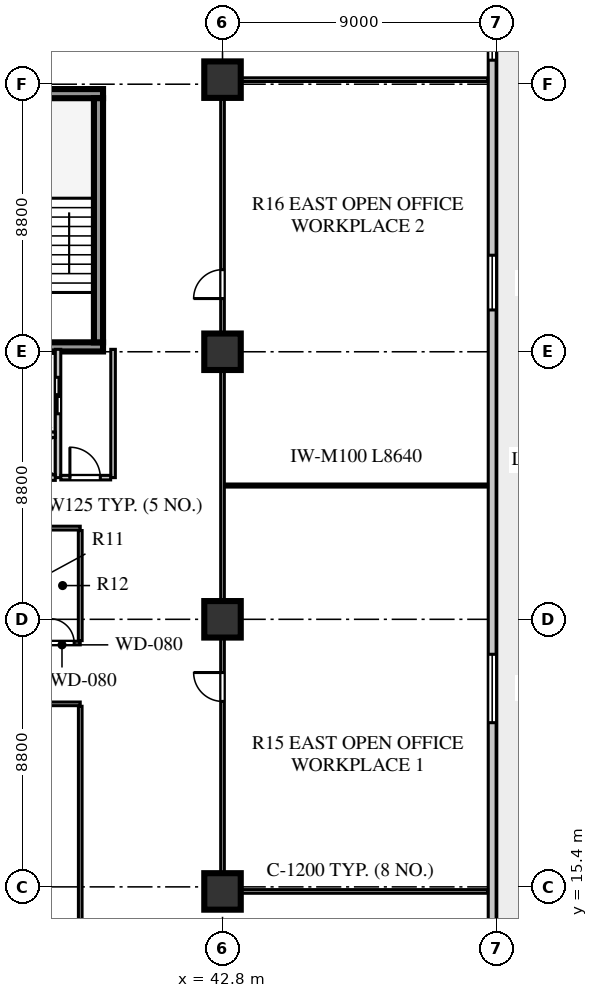
"""IFC4 building model, lengths in metres.
Left out: names, types, materials, properties, quantities, classifications, styles, units other than length and angle.
Written with IfcOpenShell. Run it as: python <this file> out.ifc"""

import sys

from ifc_helpers import new_model, si_unit, direction, frame, frame_2d, origin, origin_2d, place, context, subcontext, project, spatial, rectangle, extrude, element, fill, save


model = new_model("IFC4")
c1 = context("Model", 3, precision=1e-05, world=origin(), true_north=direction((0.0, 1.0)))
c2 = subcontext(c1, "Body", "Model", "MODEL_VIEW")
j1 = project(units=[si_unit("LENGTHUNIT", "METRE"), si_unit("PLANEANGLEUNIT", "RADIAN")], contexts=[c1])
p1 = place(None, origin())
s1 = spatial("IfcSite", under=j1, at=p1, CompositionType="ELEMENT")
p2 = place(p1, origin())
s2 = spatial("IfcBuilding", under=s1, at=p2, CompositionType="ELEMENT")
p3 = place(p2, frame((0.0, 0.0, 26.0)))
s3 = spatial("IfcBuildingStorey", under=s2, at=p3, CompositionType="ELEMENT", Elevation=26.0)
for number, where, z_axis, x_axis in (
    (1, (34.4, 33.16, 0.0), (0.0, 0.0, 1.0), (1.0, 0.0, 0.0)),
    (2, (34.4, 41.49, 0.0), (0.0, 0.0, 1.0), (1.0, 0.0, 0.0)),
):
    element("IfcWall", number, at=place(p3, frame(where, z_axis=z_axis, x_axis=x_axis)), inside=s3, PredefinedType="SHEAR", context=c2, shape_type="SweptSolid", body=[
        extrude(rectangle(XDim=4.47, YDim=0.3, at=frame_2d((2.235, 0.0))), origin(), (0.0, 0.0, 1.0), 3.72),
    ])
p4 = place(p3, frame((38.72, 33.31, 0.0), z_axis=(0.0, 0.0, 1.0), x_axis=(0.0, 1.0, 0.0)))
e3 = element("IfcWall", 3, at=p4, inside=s3, PredefinedType="SHEAR", context=c2, shape_type="SweptSolid", body=[
    extrude(rectangle(XDim=8.03, YDim=0.3, at=frame_2d((4.015, 0.0))), origin(), (0.0, 0.0, 1.0), 3.72),
])
for number, where, z_axis, x_axis in (
    (4, (42.8, 15.25, 0.0), (0.0, 0.0, 1.0), (1.0, 0.0, 0.0)),
    (5, (42.8, 24.2, 0.0), (0.0, 0.0, 1.0), (1.0, 0.0, 0.0)),
    (6, (42.8, 33.0, 0.0), (0.0, 0.0, 1.0), (1.0, 0.0, 0.0)),
    (7, (42.8, 41.95, 0.0), (0.0, 0.0, 1.0), (1.0, 0.0, 0.0)),
):
    element("IfcColumn", number, at=place(p3, frame(where, z_axis=z_axis, x_axis=x_axis)), inside=s3, PredefinedType="COLUMN", context=c2, shape_type="SweptSolid", body=[
        extrude(rectangle(XDim=1.2, YDim=1.2, at=origin_2d()), origin(), (0.0, 0.0, 1.0), 3.72),
    ])
p5 = place(p3, frame((51.67, 12.36, 0.0), z_axis=(0.0, 0.0, 1.0), x_axis=(0.0, 1.0, 0.0)))
e8 = element("IfcWall", 8, at=p5, inside=s3, PredefinedType="SOLIDWALL", context=c2, shape_type="SweptSolid", body=[
    extrude(rectangle(XDim=32.48, YDim=0.26, at=frame_2d((16.24, 0.0))), origin(), (0.0, 0.0, 1.0), 3.72),
])
p6 = place(p5, frame((0.69, 0.0, 0.0)))
e9 = element("IfcOpeningElement", 9, at=p6, cuts=e8, PredefinedType="OPENING", context=c2, shape_type="SweptSolid", body=[
    extrude(rectangle(XDim=1.0, YDim=2.05, at=frame_2d((0.5, 1.025))), frame((0.0, 0.14, 0.0), z_axis=(0.0, -1.0, 0.0), x_axis=(1.0, 0.0, 0.0)), (0.0, 0.0, 1.0), 0.28),
])
p7 = place(p5, frame((8.44, 0.0, 0.8)))
e10 = element("IfcOpeningElement", 10, at=p7, cuts=e8, PredefinedType="OPENING", context=c2, shape_type="SweptSolid", body=[
    extrude(rectangle(XDim=2.25, YDim=2.0, at=frame_2d((1.125, 1.0))), frame((0.0, 0.14, 0.0), z_axis=(0.0, -1.0, 0.0), x_axis=(1.0, 0.0, 0.0)), (0.0, 0.0, 1.0), 0.28),
])
p8 = place(p5, frame((22.015, 0.0, 0.8)))
e11 = element("IfcOpeningElement", 11, at=p8, cuts=e8, PredefinedType="OPENING", context=c2, shape_type="SweptSolid", body=[
    extrude(rectangle(XDim=1.8, YDim=2.0, at=frame_2d((0.9, 1.0))), frame((0.0, 0.14, 0.0), z_axis=(0.0, -1.0, 0.0), x_axis=(1.0, 0.0, 0.0)), (0.0, 0.0, 1.0), 0.28),
])
p9 = place(p5, frame((30.23, 0.0, 0.8)))
e12 = element("IfcOpeningElement", 12, at=p9, cuts=e8, PredefinedType="OPENING", context=c2, shape_type="SweptSolid", body=[
    extrude(rectangle(XDim=1.5, YDim=2.0, at=frame_2d((0.75, 1.0))), frame((0.0, 0.14, 0.0), z_axis=(0.0, -1.0, 0.0), x_axis=(1.0, 0.0, 0.0)), (0.0, 0.0, 1.0), 0.28),
])
p10 = place(p3, frame((37.39, 28.86, 0.0), z_axis=(0.0, 0.0, 1.0), x_axis=(0.0, 1.0, 0.0)))
e13 = element("IfcWall", 13, at=p10, inside=s3, PredefinedType="SOLIDWALL", context=c2, shape_type="SweptSolid", body=[
    extrude(rectangle(XDim=4.22, YDim=0.18, at=frame_2d((2.11, 0.0))), origin(), (0.0, 0.0, 1.0), 3.72),
])
p11 = place(p10, frame((2.1, 0.0, 0.0)))
e14 = element("IfcOpeningElement", 14, at=p11, cuts=e13, PredefinedType="OPENING", context=c2, shape_type="SweptSolid", body=[
    extrude(rectangle(XDim=1.2, YDim=2.12, at=frame_2d((0.6, 1.06))), frame((0.0, 0.1, 0.0), z_axis=(0.0, -1.0, 0.0), x_axis=(1.0, 0.0, 0.0)), (0.0, 0.0, 1.0), 0.2),
])
for number, where, z_axis, x_axis in (
    (15, (35.05, 28.86, 0.0), (0.0, 0.0, 1.0), (1.0, 0.0, 0.0)),
    (16, (35.05, 30.27, 0.0), (0.0, 0.0, 1.0), (1.0, 0.0, 0.0)),
):
    element("IfcWall", number, at=place(p3, frame(where, z_axis=z_axis, x_axis=x_axis)), inside=s3, PredefinedType="SOLIDWALL", context=c2, shape_type="SweptSolid", body=[
        extrude(rectangle(XDim=2.25, YDim=0.18, at=frame_2d((1.125, 0.0))), origin(), (0.0, 0.0, 1.0), 3.72),
    ])
p12 = place(p3, frame((39.2, 28.86, 0.0), z_axis=(0.0, 0.0, 1.0), x_axis=(0.0, 1.0, 0.0)))
e17 = element("IfcWall", 17, at=p12, inside=s3, PredefinedType="PARTITIONING", context=c2, shape_type="SweptSolid", body=[
    extrude(rectangle(XDim=4.22, YDim=0.15, at=frame_2d((2.11, 0.0))), origin(), (0.0, 0.0, 1.0), 3.72),
])
p13 = place(p3, frame((37.48, 28.86, 0.0), z_axis=(0.0, 0.0, 1.0), x_axis=(1.0, 0.0, 0.0)))
e18 = element("IfcWall", 18, at=p13, inside=s3, PredefinedType="PARTITIONING", context=c2, shape_type="SweptSolid", body=[
    extrude(rectangle(XDim=1.64, YDim=0.15, at=frame_2d((0.82, 0.0))), origin(), (0.0, 0.0, 1.0), 3.72),
])
p14 = place(p13, frame((0.3, 0.0, 0.0)))
e19 = element("IfcOpeningElement", 19, at=p14, cuts=e18, PredefinedType="OPENING", context=c2, shape_type="SweptSolid", body=[
    extrude(rectangle(XDim=1.0, YDim=2.1, at=frame_2d((0.5, 1.05))), frame((0.0, 0.085, 0.0), z_axis=(0.0, -1.0, 0.0), x_axis=(1.0, 0.0, 0.0)), (0.0, 0.0, 1.0), 0.17),
])
p15 = place(p3, frame((25.25, 21.42, 0.0), z_axis=(0.0, 0.0, 1.0), x_axis=(1.0, 0.0, 0.0)))
e20 = element("IfcWall", 20, at=p15, inside=s3, PredefinedType="PARTITIONING", context=c2, shape_type="SweptSolid", body=[
    extrude(rectangle(XDim=12.87, YDim=0.12, at=frame_2d((6.435, 0.0))), origin(), (0.0, 0.0, 1.0), 3.32),
])
p16 = place(p15, frame((5.945, 0.0, 0.0)))
e21 = element("IfcOpeningElement", 21, at=p16, cuts=e20, PredefinedType="OPENING", context=c2, shape_type="SweptSolid", body=[
    extrude(rectangle(XDim=0.95, YDim=2.08, at=frame_2d((0.475, 1.04))), frame((0.0, 0.07, 0.0), z_axis=(0.0, -1.0, 0.0), x_axis=(1.0, 0.0, 0.0)), (0.0, 0.0, 1.0), 0.14),
])
p17 = place(p3, frame((38.12, 6.88, 0.0), z_axis=(0.0, 0.0, 1.0), x_axis=(0.0, 1.0, 0.0)))
e22 = element("IfcWall", 22, at=p17, inside=s3, PredefinedType="PARTITIONING", context=c2, shape_type="SweptSolid", body=[
    extrude(rectangle(XDim=14.46, YDim=0.12, at=frame_2d((7.23, 0.0))), origin(), (0.0, 0.0, 1.0), 3.72),
])
p18 = place(p3, frame((34.6, 23.42, 0.0), z_axis=(0.0, 0.0, 1.0), x_axis=(1.0, 0.0, 0.0)))
e23 = element("IfcWall", 23, at=p18, inside=s3, PredefinedType="PARTITIONING", context=c2, shape_type="SweptSolid", body=[
    extrude(rectangle(XDim=3.52, YDim=0.12, at=frame_2d((1.76, 0.0))), origin(), (0.0, 0.0, 1.0), 3.72),
])
p19 = place(p18, frame((0.22, 0.0, 0.0)))
e24 = element("IfcOpeningElement", 24, at=p19, cuts=e23, PredefinedType="OPENING", context=c2, shape_type="SweptSolid", body=[
    extrude(rectangle(XDim=0.8, YDim=2.05, at=frame_2d((0.4, 1.025))), frame((0.0, 0.07, 0.0), z_axis=(0.0, -1.0, 0.0), x_axis=(1.0, 0.0, 0.0)), (0.0, 0.0, 1.0), 0.14),
])
p20 = place(p18, frame((1.38, 0.0, 0.0)))
e25 = element("IfcOpeningElement", 25, at=p20, cuts=e23, PredefinedType="OPENING", context=c2, shape_type="SweptSolid", body=[
    extrude(rectangle(XDim=0.8, YDim=2.05, at=frame_2d((0.4, 1.025))), frame((0.0, 0.07, 0.0), z_axis=(0.0, -1.0, 0.0), x_axis=(1.0, 0.0, 0.0)), (0.0, 0.0, 1.0), 0.14),
])
p21 = place(p18, frame((2.52, 0.0, 0.0)))
e26 = element("IfcOpeningElement", 26, at=p21, cuts=e23, PredefinedType="OPENING", context=c2, shape_type="SweptSolid", body=[
    extrude(rectangle(XDim=0.8, YDim=2.05, at=frame_2d((0.4, 1.025))), frame((0.0, 0.07, 0.0), z_axis=(0.0, -1.0, 0.0), x_axis=(1.0, 0.0, 0.0)), (0.0, 0.0, 1.0), 0.14),
])
p22 = place(p3, frame((42.8, 15.25, 0.0), z_axis=(0.0, 0.0, 1.0), x_axis=(0.0, 1.0, 0.0)))
e27 = element("IfcWall", 27, at=p22, inside=s3, PredefinedType="PARTITIONING", context=c2, shape_type="SweptSolid", body=[
    extrude(rectangle(XDim=26.7, YDim=0.12, at=frame_2d((13.35, 0.0))), origin(), (0.0, 0.0, 1.0), 3.02),
])
p23 = place(p22, frame((6.25, 0.0, 0.0)))
e28 = element("IfcOpeningElement", 28, at=p23, cuts=e27, PredefinedType="OPENING", context=c2, shape_type="SweptSolid", body=[
    extrude(rectangle(XDim=0.95, YDim=2.08, at=frame_2d((0.475, 1.04))), frame((0.0, 0.07, 0.0), z_axis=(0.0, -1.0, 0.0), x_axis=(1.0, 0.0, 0.0)), (0.0, 0.0, 1.0), 0.14),
])
p24 = place(p22, frame((19.5, 0.0, 0.0)))
e29 = element("IfcOpeningElement", 29, at=p24, cuts=e27, PredefinedType="OPENING", context=c2, shape_type="SweptSolid", body=[
    extrude(rectangle(XDim=0.95, YDim=2.08, at=frame_2d((0.475, 1.04))), frame((0.0, 0.07, 0.0), z_axis=(0.0, -1.0, 0.0), x_axis=(1.0, 0.0, 0.0)), (0.0, 0.0, 1.0), 0.14),
])
for number, where, z_axis, x_axis in (
    (30, (42.88, 15.25, 0.0), (0.0, 0.0, 1.0), (1.0, 0.0, 0.0)),
    (31, (42.88, 41.95, 0.0), (0.0, 0.0, 1.0), (1.0, 0.0, 0.0)),
):
    element("IfcWall", number, at=place(p3, frame(where, z_axis=z_axis, x_axis=x_axis)), inside=s3, PredefinedType="PARTITIONING", context=c2, shape_type="SweptSolid", body=[
        extrude(rectangle(XDim=8.64, YDim=0.12, at=frame_2d((4.32, 0.0))), origin(), (0.0, 0.0, 1.0), 3.22),
    ])
p25 = place(p3, frame((34.6, 27.2, 0.0), z_axis=(0.0, 0.0, 1.0), x_axis=(1.0, 0.0, 0.0)))
e32 = element("IfcWall", 32, at=p25, inside=s3, PredefinedType="PLUMBINGWALL", context=c2, shape_type="SweptSolid", body=[
    extrude(rectangle(XDim=3.52, YDim=0.125, at=frame_2d((1.76, 0.0))), origin(), (0.0, 0.0, 1.0), 3.32),
])
p26 = place(p3, frame((38.12, 23.5, 0.0), z_axis=(0.0, 0.0, 1.0), x_axis=(0.0, 1.0, 0.0)))
e33 = element("IfcWall", 33, at=p26, inside=s3, PredefinedType="PLUMBINGWALL", context=c2, shape_type="SweptSolid", body=[
    extrude(rectangle(XDim=3.62, YDim=0.125, at=frame_2d((1.81, 0.0))), origin(), (0.0, 0.0, 1.0), 3.72),
])
p27 = place(p3, frame((42.88, 28.6, 0.0), z_axis=(0.0, 0.0, 1.0), x_axis=(1.0, 0.0, 0.0)))
e34 = element("IfcWall", 34, at=p27, inside=s3, PredefinedType="MOVABLE", context=c2, shape_type="SweptSolid", body=[
    extrude(rectangle(XDim=8.64, YDim=0.1, at=frame_2d((4.32, 0.0))), origin(), (0.0, 0.0, 1.0), 3.72),
])
p28 = place(p7, origin())
e35 = element("IfcWindow", 35, at=p28, inside=s3, PartitioningType="SINGLE_PANEL", PredefinedType="WINDOW", context=c2, shape_type="SweptSolid", body=[
    extrude(rectangle(XDim=2.25, YDim=2.0, at=frame_2d((1.125, 1.0))), frame((0.0, 0.03, 0.0), z_axis=(0.0, -1.0, 0.0), x_axis=(1.0, 0.0, 0.0)), (0.0, 0.0, 1.0), 0.06),
])
fill(e10, e35)
p29 = place(p8, origin())
e36 = element("IfcWindow", 36, at=p29, inside=s3, PartitioningType="SINGLE_PANEL", PredefinedType="WINDOW", context=c2, shape_type="SweptSolid", body=[
    extrude(rectangle(XDim=1.8, YDim=2.0, at=frame_2d((0.9, 1.0))), frame((0.0, 0.03, 0.0), z_axis=(0.0, -1.0, 0.0), x_axis=(1.0, 0.0, 0.0)), (0.0, 0.0, 1.0), 0.06),
])
fill(e11, e36)
p30 = place(p9, origin())
e37 = element("IfcWindow", 37, at=p30, inside=s3, PartitioningType="SINGLE_PANEL", PredefinedType="WINDOW", context=c2, shape_type="SweptSolid", body=[
    extrude(rectangle(XDim=1.5, YDim=2.0, at=frame_2d((0.75, 1.0))), frame((0.0, 0.03, 0.0), z_axis=(0.0, -1.0, 0.0), x_axis=(1.0, 0.0, 0.0)), (0.0, 0.0, 1.0), 0.06),
])
fill(e12, e37)
p31 = place(p11, frame((1.2, 0.0, 0.0), z_axis=(0.0, 0.0, 1.0), x_axis=(-1.0, 0.0, 0.0)))
e38 = element("IfcDoor", 38, at=p31, inside=s3, OperationType="DOUBLE_DOOR_SLIDING", PredefinedType="DOOR", context=c2, shape_type="SweptSolid", body=[
    extrude(rectangle(XDim=1.2, YDim=2.12, at=frame_2d((0.6, 1.06))), frame((0.0, 0.025, 0.0), z_axis=(0.0, -1.0, 0.0), x_axis=(1.0, 0.0, 0.0)), (0.0, 0.0, 1.0), 0.05),
])
fill(e14, e38)
p32 = place(p14, origin())
e39 = element("IfcDoor", 39, at=p32, inside=s3, OperationType="SINGLE_SWING_LEFT", PredefinedType="DOOR", context=c2, shape_type="SweptSolid", body=[
    extrude(rectangle(XDim=1.0, YDim=2.1, at=frame_2d((0.5, 1.05))), frame((0.0, 0.025, 0.0), z_axis=(0.0, -1.0, 0.0), x_axis=(1.0, 0.0, 0.0)), (0.0, 0.0, 1.0), 0.05),
])
fill(e19, e39)
p33 = place(p21, origin())
e40 = element("IfcDoor", 40, at=p33, inside=s3, OperationType="SINGLE_SWING_LEFT", PredefinedType="DOOR", context=c2, shape_type="SweptSolid", body=[
    extrude(rectangle(XDim=0.8, YDim=2.05, at=frame_2d((0.4, 1.025))), frame((0.0, 0.025, 0.0), z_axis=(0.0, -1.0, 0.0), x_axis=(1.0, 0.0, 0.0)), (0.0, 0.0, 1.0), 0.05),
])
fill(e26, e40)
p34 = place(p23, origin())
e41 = element("IfcDoor", 41, at=p34, inside=s3, OperationType="SINGLE_SWING_RIGHT", PredefinedType="DOOR", context=c2, shape_type="SweptSolid", body=[
    extrude(rectangle(XDim=0.95, YDim=2.08, at=frame_2d((0.475, 1.04))), frame((0.0, 0.025, 0.0), z_axis=(0.0, -1.0, 0.0), x_axis=(1.0, 0.0, 0.0)), (0.0, 0.0, 1.0), 0.05),
])
fill(e28, e41)
p35 = place(p24, origin())
e42 = element("IfcDoor", 42, at=p35, inside=s3, OperationType="SINGLE_SWING_LEFT", PredefinedType="DOOR", context=c2, shape_type="SweptSolid", body=[
    extrude(rectangle(XDim=0.95, YDim=2.08, at=frame_2d((0.475, 1.04))), frame((0.0, 0.025, 0.0), z_axis=(0.0, -1.0, 0.0), x_axis=(1.0, 0.0, 0.0)), (0.0, 0.0, 1.0), 0.05),
])
fill(e29, e42)
save(model, sys.argv[1])
